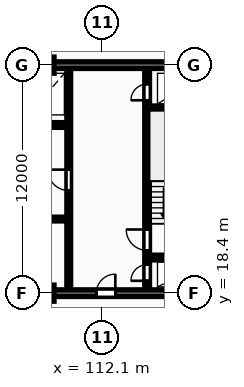
"""IFC4 building model, lengths in metres.
Left out: names, types, materials, properties, quantities, classifications, styles, units other than length and angle.
Written with IfcOpenShell. Run it as: python <this file> out.ifc"""

import sys

from ifc_helpers import new_model, si_unit, direction, frame, frame_2d, origin, origin_2d, place, context, subcontext, project, spatial, rectangle, extrude, element, fill, save


model = new_model("IFC4")
c1 = context("Model", 3, precision=1e-05, world=origin(), true_north=direction((0.0, 1.0)))
c2 = subcontext(c1, "Body", "Model", "MODEL_VIEW")
j1 = project(units=[si_unit("LENGTHUNIT", "METRE"), si_unit("PLANEANGLEUNIT", "RADIAN")], contexts=[c1])
p1 = place(None, origin())
s1 = spatial("IfcSite", under=j1, at=p1, CompositionType="ELEMENT")
p2 = place(p1, origin())
s2 = spatial("IfcBuilding", under=s1, at=p2, CompositionType="ELEMENT")
p3 = place(p2, frame((0.0, 0.0, 24.0)))
s3 = spatial("IfcBuildingStorey", under=s2, at=p3, CompositionType="ELEMENT", Elevation=24.0)
for number, where, z_axis, x_axis in (
    (1, (109.1, 18.4, 0.0), (0.0, 0.0, 1.0), (1.0, 0.0, 0.0)),
    (2, (109.1, 30.4, 0.0), (0.0, 0.0, 1.0), (1.0, 0.0, 0.0)),
):
    element("IfcColumn", number, at=place(p3, frame(where, z_axis=z_axis, x_axis=x_axis)), inside=s3, PredefinedType="COLUMN", context=c2, shape_type="SweptSolid", body=[
        extrude(rectangle(XDim=0.95, YDim=0.85, at=origin_2d()), origin(), (0.0, 0.0, 1.0), 3.25),
    ])
p4 = place(p3, frame((81.925, 30.4, 0.0), z_axis=(0.0, 0.0, 1.0), x_axis=(1.0, 0.0, 0.0)))
e3 = element("IfcWall", 3, at=p4, inside=s3, PredefinedType="SHEAR", context=c2, shape_type="SweptSolid", body=[
    extrude(rectangle(XDim=36.265, YDim=0.35, at=frame_2d((18.132, 0.0))), origin(), (0.0, 0.0, 1.0), 3.25),
])
p5 = place(p3, frame((81.925, 18.4, 0.0), z_axis=(0.0, 0.0, 1.0), x_axis=(1.0, 0.0, 0.0)))
e4 = element("IfcWall", 4, at=p5, inside=s3, PredefinedType="SHEAR", context=c2, shape_type="SweptSolid", body=[
    extrude(rectangle(XDim=36.265, YDim=0.35, at=frame_2d((18.132, 0.0))), origin(), (0.0, 0.0, 1.0), 3.25),
])
p6 = place(p5, frame((5.675, 0.0, 0.0)))
e5 = element("IfcOpeningElement", 5, at=p6, cuts=e4, PredefinedType="OPENING", context=c2, shape_type="SweptSolid", body=[
    extrude(rectangle(XDim=1.0, YDim=2.15, at=frame_2d((0.5, 1.075))), frame((0.0, 0.185, 0.0), z_axis=(0.0, -1.0, 0.0), x_axis=(1.0, 0.0, 0.0)), (0.0, 0.0, 1.0), 0.37),
])
p7 = place(p5, frame((21.925, 0.0, 0.0)))
e6 = element("IfcOpeningElement", 6, at=p7, cuts=e4, PredefinedType="OPENING", context=c2, shape_type="SweptSolid", body=[
    extrude(rectangle(XDim=1.5, YDim=2.2, at=frame_2d((0.75, 1.1))), frame((0.0, 0.185, 0.0), z_axis=(0.0, -1.0, 0.0), x_axis=(1.0, 0.0, 0.0)), (0.0, 0.0, 1.0), 0.37),
])
p8 = place(p5, frame((29.875, 0.0, 0.0)))
e7 = element("IfcOpeningElement", 7, at=p8, cuts=e4, PredefinedType="OPENING", context=c2, shape_type="SweptSolid", body=[
    extrude(rectangle(XDim=1.0, YDim=2.15, at=frame_2d((0.5, 1.075))), frame((0.0, 0.185, 0.0), z_axis=(0.0, -1.0, 0.0), x_axis=(1.0, 0.0, 0.0)), (0.0, 0.0, 1.0), 0.37),
])
p9 = place(p3, frame((99.68, 27.25, 0.0), z_axis=(0.0, 0.0, 1.0), x_axis=(1.0, 0.0, 0.0)))
e8 = element("IfcWall", 8, at=p9, inside=s3, PredefinedType="SHEAR", context=c2, shape_type="SweptSolid", body=[
    extrude(rectangle(XDim=10.54, YDim=0.25, at=frame_2d((5.27, 0.0))), origin(), (0.0, 0.0, 1.0), 3.25),
])
p10 = place(p9, frame((8.92, 0.0, 0.0)))
e9 = element("IfcOpeningElement", 9, at=p10, cuts=e8, PredefinedType="OPENING", context=c2, shape_type="SweptSolid", body=[
    extrude(rectangle(XDim=0.85, YDim=2.05, at=frame_2d((0.425, 1.025))), frame((0.0, 0.135, 0.0), z_axis=(0.0, -1.0, 0.0), x_axis=(1.0, 0.0, 0.0)), (0.0, 0.0, 1.0), 0.27),
])
p11 = place(p3, frame((91.08, 22.3, 0.0), z_axis=(0.0, 0.0, 1.0), x_axis=(1.0, 0.0, 0.0)))
e10 = element("IfcWall", 10, at=p11, inside=s3, PredefinedType="PARTITIONING", context=c2, shape_type="SweptSolid", body=[
    extrude(rectangle(XDim=19.14, YDim=0.2, at=frame_2d((9.57, 0.0))), origin(), (0.0, 0.0, 1.0), 2.97),
])
p12 = place(p11, frame((1.15, 0.0, 0.0)))
e11 = element("IfcOpeningElement", 11, at=p12, cuts=e10, PredefinedType="OPENING", context=c2, shape_type="SweptSolid", body=[
    extrude(rectangle(XDim=0.85, YDim=2.05, at=frame_2d((0.425, 1.025))), frame((0.0, 0.11, 0.0), z_axis=(0.0, -1.0, 0.0), x_axis=(1.0, 0.0, 0.0)), (0.0, 0.0, 1.0), 0.22),
])
p13 = place(p11, frame((3.2, 0.0, 0.0)))
e12 = element("IfcOpeningElement", 12, at=p13, cuts=e10, PredefinedType="OPENING", context=c2, shape_type="SweptSolid", body=[
    extrude(rectangle(XDim=0.85, YDim=2.05, at=frame_2d((0.425, 1.025))), frame((0.0, 0.11, 0.0), z_axis=(0.0, -1.0, 0.0), x_axis=(1.0, 0.0, 0.0)), (0.0, 0.0, 1.0), 0.22),
])
p14 = place(p11, frame((12.72, 0.0, 0.0)))
e13 = element("IfcOpeningElement", 13, at=p14, cuts=e10, PredefinedType="OPENING", context=c2, shape_type="SweptSolid", body=[
    extrude(rectangle(XDim=1.5, YDim=2.2, at=frame_2d((0.75, 1.1))), frame((0.0, 0.11, 0.0), z_axis=(0.0, -1.0, 0.0), x_axis=(1.0, 0.0, 0.0)), (0.0, 0.0, 1.0), 0.22),
])
p15 = place(p11, frame((6.42, 0.0, 0.0)))
e14 = element("IfcOpeningElement", 14, at=p15, cuts=e10, PredefinedType="OPENING", context=c2, shape_type="SweptSolid", body=[
    extrude(rectangle(XDim=0.92, YDim=2.08, at=frame_2d((0.46, 1.04))), frame((0.0, 0.11, 0.0), z_axis=(0.0, -1.0, 0.0), x_axis=(1.0, 0.0, 0.0)), (0.0, 0.0, 1.0), 0.22),
])
p16 = place(p11, frame((15.87, 0.0, 0.0)))
e15 = element("IfcOpeningElement", 15, at=p16, cuts=e10, PredefinedType="OPENING", context=c2, shape_type="SweptSolid", body=[
    extrude(rectangle(XDim=0.92, YDim=2.08, at=frame_2d((0.46, 1.04))), frame((0.0, 0.11, 0.0), z_axis=(0.0, -1.0, 0.0), x_axis=(1.0, 0.0, 0.0)), (0.0, 0.0, 1.0), 0.22),
])
p17 = place(p3, frame((110.35, 18.6, 0.0), z_axis=(0.0, 0.0, 1.0), x_axis=(0.0, 1.0, 0.0)))
e16 = element("IfcWall", 16, at=p17, inside=s3, PredefinedType="PARTITIONING", context=c2, shape_type="SweptSolid", body=[
    extrude(rectangle(XDim=11.6, YDim=0.2, at=frame_2d((5.8, 0.0))), origin(), (0.0, 0.0, 1.0), 2.97),
])
p18 = place(p17, frame((5.2, 0.0, 0.0)))
e17 = element("IfcOpeningElement", 17, at=p18, cuts=e16, PredefinedType="OPENING", context=c2, shape_type="SweptSolid", body=[
    extrude(rectangle(XDim=1.1, YDim=2.15, at=frame_2d((0.55, 1.075))), frame((0.0, 0.11, 0.0), z_axis=(0.0, -1.0, 0.0), x_axis=(1.0, 0.0, 0.0)), (0.0, 0.0, 1.0), 0.22),
])
p19 = place(p3, frame((114.475, 18.6, 0.0), z_axis=(0.0, 0.0, 1.0), x_axis=(0.0, 1.0, 0.0)))
e18 = element("IfcWall", 18, at=p19, inside=s3, PredefinedType="SHEAR", context=c2, shape_type="SweptSolid", body=[
    extrude(rectangle(XDim=11.6, YDim=0.25, at=frame_2d((5.8, 0.0))), origin(), (0.0, 0.0, 1.0), 3.25),
])
p20 = place(p19, frame((0.45, 0.0, 0.0)))
e19 = element("IfcOpeningElement", 19, at=p20, cuts=e18, PredefinedType="OPENING", context=c2, shape_type="SweptSolid", body=[
    extrude(rectangle(XDim=0.85, YDim=2.05, at=frame_2d((0.425, 1.025))), frame((0.0, 0.135, 0.0), z_axis=(0.0, -1.0, 0.0), x_axis=(1.0, 0.0, 0.0)), (0.0, 0.0, 1.0), 0.27),
])
p21 = place(p19, frame((2.05, 0.0, 0.0)))
e20 = element("IfcOpeningElement", 20, at=p21, cuts=e18, PredefinedType="OPENING", context=c2, shape_type="SweptSolid", body=[
    extrude(rectangle(XDim=1.1, YDim=2.1, at=frame_2d((0.55, 1.05))), frame((0.0, 0.135, 0.0), z_axis=(0.0, -1.0, 0.0), x_axis=(1.0, 0.0, 0.0)), (0.0, 0.0, 1.0), 0.27),
])
p22 = place(p19, frame((9.95, 0.0, 0.0)))
e21 = element("IfcOpeningElement", 21, at=p22, cuts=e18, PredefinedType="OPENING", context=c2, shape_type="SweptSolid", body=[
    extrude(rectangle(XDim=0.85, YDim=2.05, at=frame_2d((0.425, 1.025))), frame((0.0, 0.135, 0.0), z_axis=(0.0, -1.0, 0.0), x_axis=(1.0, 0.0, 0.0)), (0.0, 0.0, 1.0), 0.27),
])
for number, where, z_axis, x_axis in (
    (22, (114.6, 20.275, 0.0), (0.0, 0.0, 1.0), (1.0, 0.0, 0.0)),
    (23, (114.6, 28.125, 0.0), (0.0, 0.0, 1.0), (1.0, 0.0, 0.0)),
):
    element("IfcWall", number, at=place(p3, frame(where, z_axis=z_axis, x_axis=x_axis)), inside=s3, PredefinedType="SHEAR", context=c2, shape_type="SweptSolid", body=[
        extrude(rectangle(XDim=3.24, YDim=0.25, at=frame_2d((1.62, 0.0))), origin(), (0.0, 0.0, 1.0), 3.25),
    ])
p23 = place(p8, origin())
e24 = element("IfcDoor", 24, at=p23, inside=s3, OperationType="SINGLE_SWING_RIGHT", PredefinedType="DOOR", context=c2, shape_type="SweptSolid", body=[
    extrude(rectangle(XDim=1.0, YDim=2.15, at=frame_2d((0.5, 1.075))), frame((0.0, 0.025, 0.0), z_axis=(0.0, -1.0, 0.0), x_axis=(1.0, 0.0, 0.0)), (0.0, 0.0, 1.0), 0.05),
])
fill(e7, e24)
p24 = place(p18, origin())
e25 = element("IfcDoor", 25, at=p24, inside=s3, OperationType="SINGLE_SWING_RIGHT", PredefinedType="DOOR", context=c2, shape_type="SweptSolid", body=[
    extrude(rectangle(XDim=1.1, YDim=2.15, at=frame_2d((0.55, 1.075))), frame((0.0, 0.025, 0.0), z_axis=(0.0, -1.0, 0.0), x_axis=(1.0, 0.0, 0.0)), (0.0, 0.0, 1.0), 0.05),
])
fill(e17, e25)
p25 = place(p20, origin())
e26 = element("IfcDoor", 26, at=p25, inside=s3, OperationType="SINGLE_SWING_LEFT", PredefinedType="DOOR", context=c2, shape_type="SweptSolid", body=[
    extrude(rectangle(XDim=0.85, YDim=2.05, at=frame_2d((0.425, 1.025))), frame((0.0, 0.025, 0.0), z_axis=(0.0, -1.0, 0.0), x_axis=(1.0, 0.0, 0.0)), (0.0, 0.0, 1.0), 0.05),
])
fill(e19, e26)
p26 = place(p21, origin())
e27 = element("IfcDoor", 27, at=p26, inside=s3, OperationType="SINGLE_SWING_RIGHT", PredefinedType="DOOR", context=c2, shape_type="SweptSolid", body=[
    extrude(rectangle(XDim=1.1, YDim=2.1, at=frame_2d((0.55, 1.05))), frame((0.0, 0.025, 0.0), z_axis=(0.0, -1.0, 0.0), x_axis=(1.0, 0.0, 0.0)), (0.0, 0.0, 1.0), 0.05),
])
fill(e20, e27)
p27 = place(p22, origin())
e28 = element("IfcDoor", 28, at=p27, inside=s3, OperationType="SINGLE_SWING_LEFT", PredefinedType="DOOR", context=c2, shape_type="SweptSolid", body=[
    extrude(rectangle(XDim=0.85, YDim=2.05, at=frame_2d((0.425, 1.025))), frame((0.0, 0.025, 0.0), z_axis=(0.0, -1.0, 0.0), x_axis=(1.0, 0.0, 0.0)), (0.0, 0.0, 1.0), 0.05),
])
fill(e21, e28)
save(model, sys.argv[1])
